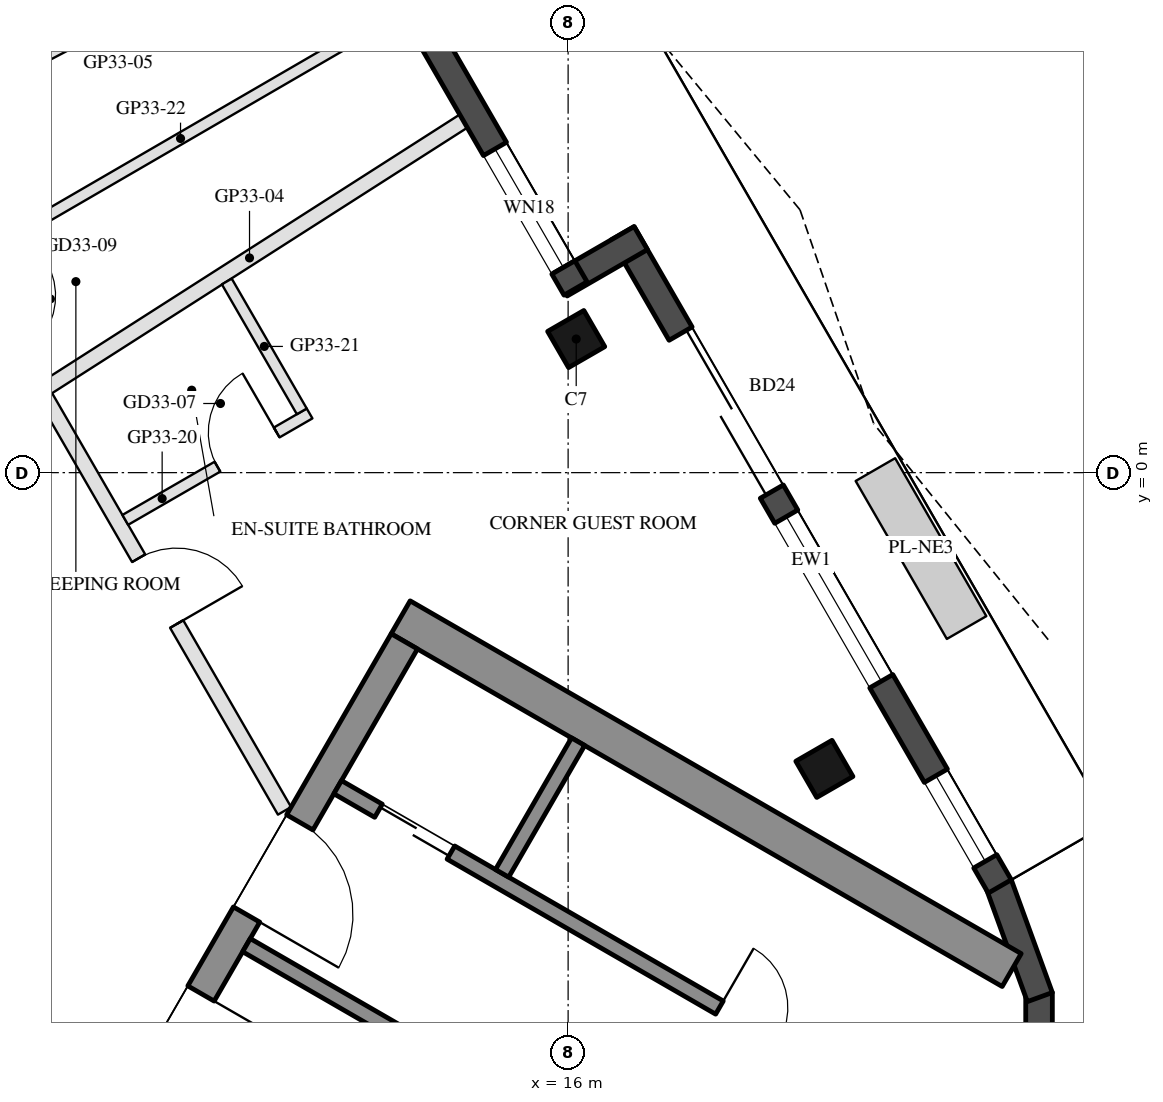
"""IFC4 building model, lengths in metres.
Left out: names, types, materials, properties, quantities, classifications, styles, units other than length and angle.
Written with IfcOpenShell. Run it as: python <this file> out.ifc"""

import sys

from ifc_helpers import new_model, si_unit, direction, frame, frame_2d, origin, origin_2d, place, context, subcontext, project, spatial, rectangle, hollow_rectangle, extrude, boolean, halfspace, element, fill, save


model = new_model("IFC4")
c1 = context("Model", 3, precision=1e-05, world=origin(), true_north=direction((0.0, 1.0)))
c2 = subcontext(c1, "Body", "Model", "MODEL_VIEW")
j1 = project(units=[si_unit("LENGTHUNIT", "METRE"), si_unit("PLANEANGLEUNIT", "RADIAN")], contexts=[c1])
p1 = place(None, origin())
s1 = spatial("IfcSite", under=j1, at=p1, CompositionType="ELEMENT")
p2 = place(p1, origin())
s2 = spatial("IfcBuilding", under=s1, at=p2, CompositionType="ELEMENT")
p3 = place(p2, frame((0.0, 0.0, 313.3)))
s3 = spatial("IfcBuildingStorey", under=s2, at=p3, CompositionType="ELEMENT", Elevation=313.3)
p4 = place(p3, frame((19.372, -3.898, 0.0), z_axis=(0.0, 0.0, 1.0), x_axis=(-0.5, 0.866025403784, 0.0)))
e1 = element("IfcColumn", 1, at=p4, inside=s3, PredefinedType="COLUMN", context=c2, shape_type="SweptSolid", body=[
    boolean("DIFFERENCE", extrude(hollow_rectangle(XDim=0.55, YDim=0.55, WallThickness=0.025, at=origin_2d()), origin(), (0.0, 0.0, 1.0), 3.7), halfspace(frame((0.0, 0.0, 0.04), z_axis=(0.0, 0.0, 1.0), x_axis=(1.0, 0.0, 0.0)), True)),
])
p5 = place(p3, frame((16.106, 1.758, 0.0), z_axis=(0.0, 0.0, 1.0), x_axis=(-0.5, 0.866025403784, 0.0)))
e2 = element("IfcColumn", 2, at=p5, inside=s3, PredefinedType="COLUMN", context=c2, shape_type="SweptSolid", body=[
    boolean("DIFFERENCE", extrude(hollow_rectangle(XDim=0.55, YDim=0.55, WallThickness=0.025, at=origin_2d()), origin(), (0.0, 0.0, 1.0), 3.7), halfspace(frame((0.0, 0.0, 0.034), z_axis=(0.0, 0.0, 1.0), x_axis=(1.0, 0.0, 0.0)), True)),
])
for number, where, z_axis, x_axis in (
    (3, (22.196, -8.42, 0.0), (0.0, 0.0, 1.0), (0.0, 1.0, 0.0)),
    (4, (22.206, -6.9, 0.0), (0.0, 0.0, 1.0), (-0.342, 0.94, 0.0)),
):
    element("IfcWall", number, at=place(p3, frame(where, z_axis=z_axis, x_axis=x_axis)), inside=s3, PredefinedType="SOLIDWALL", context=c2, shape_type="SweptSolid", body=[
        extrude(rectangle(XDim=1.579, YDim=0.35, at=frame_2d((0.79, 0.0))), origin(), (0.0, 0.0, 1.0), 3.55),
    ])
p6 = place(p3, frame((21.679, -5.444, 0.0), z_axis=(0.0, 0.0, 1.0), x_axis=(-0.500020587865, 0.866013517049, 0.0)))
e5 = element("IfcWall", 5, at=p6, inside=s3, PredefinedType="SOLIDWALL", context=c2, shape_type="SweptSolid", body=[
    extrude(rectangle(XDim=9.924, YDim=0.35, at=frame_2d((4.962, 0.0))), origin(), (0.0, 0.0, 1.0), 3.55),
])
p7 = place(p6, frame((0.381, 0.0, 0.3)))
e6 = element("IfcOpeningElement", 6, at=p7, cuts=e5, PredefinedType="OPENING", context=c2, shape_type="SweptSolid", body=[
    extrude(rectangle(XDim=1.3, YDim=2.65, at=frame_2d((0.65, 1.325))), frame((0.0, 0.185, 0.0), z_axis=(0.0, -1.0, 0.0), x_axis=(1.0, 0.0, 0.0)), (0.0, 0.0, 1.0), 0.37),
])
p8 = place(p6, frame((5.999, 0.0, 0.0)))
e7 = element("IfcOpeningElement", 7, at=p8, cuts=e5, PredefinedType="OPENING", context=c2, shape_type="SweptSolid", body=[
    extrude(rectangle(XDim=2.4, YDim=2.4, at=frame_2d((1.2, 1.2))), frame((0.0, 0.185, 0.0), z_axis=(0.0, -1.0, 0.0), x_axis=(1.0, 0.0, 0.0)), (0.0, 0.0, 1.0), 0.37),
])
p9 = place(p6, frame((3.118, 0.0, 0.3)))
e8 = element("IfcOpeningElement", 8, at=p9, cuts=e5, PredefinedType="OPENING", context=c2, shape_type="SweptSolid", body=[
    extrude(rectangle(XDim=2.5, YDim=2.65, at=frame_2d((1.25, 1.325))), frame((0.0, 0.185, 0.0), z_axis=(0.0, -1.0, 0.0), x_axis=(1.0, 0.0, 0.0)), (0.0, 0.0, 1.0), 0.37),
])
p10 = place(p3, frame((16.956, 3.086, 0.0), z_axis=(0.0, 0.0, 1.0), x_axis=(-0.866005645448, -0.500034220881, 0.0)))
e9 = element("IfcWall", 9, at=p10, inside=s3, PredefinedType="SOLIDWALL", context=c2, shape_type="SweptSolid", body=[
    extrude(rectangle(XDim=1.22, YDim=0.35, at=frame_2d((0.61, 0.0))), origin(), (0.0, 0.0, 1.0), 3.55),
])
p11 = place(p3, frame((16.098, 2.423, 0.0), z_axis=(0.0, 0.0, 1.0), x_axis=(-0.499996591357, 0.866027371756, 0.0)))
e10 = element("IfcWall", 10, at=p11, inside=s3, PredefinedType="SOLIDWALL", context=c2, shape_type="SweptSolid", body=[
    extrude(rectangle(XDim=5.371, YDim=0.35, at=frame_2d((2.685, 0.0))), origin(), (0.0, 0.0, 1.0), 3.55),
])
p12 = place(p11, frame((0.32, 0.0, 0.3)))
e11 = element("IfcOpeningElement", 11, at=p12, cuts=e10, PredefinedType="OPENING", context=c2, shape_type="SweptSolid", body=[
    extrude(rectangle(XDim=1.8, YDim=2.65, at=frame_2d((0.9, 1.325))), frame((0.0, 0.185, 0.0), z_axis=(0.0, -1.0, 0.0), x_axis=(1.0, 0.0, 0.0)), (0.0, 0.0, 1.0), 0.37),
])
p13 = place(p3, frame((13.797, -1.903, 0.0), z_axis=(0.0, 0.0, 1.0), x_axis=(0.866025286072, -0.500000203884, 0.0)))
e12 = element("IfcWall", 12, at=p13, inside=s3, PredefinedType="SHEAR", context=c2, shape_type="SweptSolid", body=[
    extrude(rectangle(XDim=9.283, YDim=0.5, at=frame_2d((4.641, 0.0))), origin(), (0.0, 0.0, 1.0), 3.5),
])
p14 = place(p3, frame((8.845, -10.88, 0.0), z_axis=(0.0, 0.0, 1.0), x_axis=(0.500004234368, 0.866022959057, 0.0)))
e13 = element("IfcWall", 13, at=p14, inside=s3, PredefinedType="SHEAR", context=c2, shape_type="SweptSolid", body=[
    extrude(rectangle(XDim=10.0, YDim=0.4, at=frame_2d((5.0, 0.0))), origin(), (0.0, 0.0, 1.0), 3.5),
])
p15 = place(p14, frame((3.55, 0.0, 0.0)))
e14 = element("IfcOpeningElement", 14, at=p15, cuts=e13, PredefinedType="OPENING", context=c2, shape_type="SweptSolid", body=[
    extrude(rectangle(XDim=1.1, YDim=2.1, at=frame_2d((0.55, 1.05))), frame((0.0, 0.21, 0.0), z_axis=(0.0, -1.0, 0.0), x_axis=(1.0, 0.0, 0.0)), (0.0, 0.0, 1.0), 0.42),
])
p16 = place(p14, frame((5.85, 0.0, 0.0)))
e15 = element("IfcOpeningElement", 15, at=p16, cuts=e13, PredefinedType="OPENING", context=c2, shape_type="SweptSolid", body=[
    extrude(rectangle(XDim=1.4, YDim=2.1, at=frame_2d((0.7, 1.05))), frame((0.0, 0.21, 0.0), z_axis=(0.0, -1.0, 0.0), x_axis=(1.0, 0.0, 0.0)), (0.0, 0.0, 1.0), 0.42),
])
p17 = place(p3, frame((11.768, -6.217, 0.0), z_axis=(0.0, 0.0, 1.0), x_axis=(0.866050077142, -0.499957262057, 0.0)))
e16 = element("IfcWall", 16, at=p17, inside=s3, PredefinedType="SHEAR", context=c2, shape_type="SweptSolid", body=[
    extrude(rectangle(XDim=2.4, YDim=0.2, at=frame_2d((1.2, 0.0))), origin(), (0.0, 0.0, 1.0), 3.5),
])
p18 = place(p3, frame((12.968, -4.138, 0.0), z_axis=(0.0, 0.0, 1.0), x_axis=(0.866025710499, -0.499999468754, 0.0)))
e17 = element("IfcWall", 17, at=p18, inside=s3, PredefinedType="SHEAR", context=c2, shape_type="SweptSolid", body=[
    extrude(rectangle(XDim=10.121, YDim=0.2, at=frame_2d((5.061, 0.0))), origin(), (0.0, 0.0, 1.0), 3.5),
])
p19 = place(p18, frame((0.62, 0.0, 0.0)))
e18 = element("IfcOpeningElement", 18, at=p19, cuts=e17, PredefinedType="OPENING", context=c2, shape_type="SweptSolid", body=[
    extrude(rectangle(XDim=1.1, YDim=2.1, at=frame_2d((0.55, 1.05))), frame((0.0, 0.11, 0.0), z_axis=(0.0, -1.0, 0.0), x_axis=(1.0, 0.0, 0.0)), (0.0, 0.0, 1.0), 0.22),
])
p20 = place(p18, frame((5.8, 0.0, 0.0)))
e19 = element("IfcOpeningElement", 19, at=p20, cuts=e17, PredefinedType="OPENING", context=c2, shape_type="SweptSolid", body=[
    extrude(rectangle(XDim=0.9, YDim=2.1, at=frame_2d((0.45, 1.05))), frame((0.0, 0.11, 0.0), z_axis=(0.0, -1.0, 0.0), x_axis=(1.0, 0.0, 0.0)), (0.0, 0.0, 1.0), 0.22),
])
p21 = place(p3, frame((15.131, -5.272, 0.0), z_axis=(0.0, 0.0, 1.0), x_axis=(0.499972520799, 0.866041268327, 0.0)))
e20 = element("IfcWall", 20, at=p21, inside=s3, PredefinedType="SHEAR", context=c2, shape_type="SweptSolid", body=[
    extrude(rectangle(XDim=2.0, YDim=0.2, at=frame_2d((1.0, 0.0))), origin(), (0.0, 0.0, 1.0), 3.5),
])
p22 = place(p3, frame((14.624, 4.625, 0.0), z_axis=(0.0, 0.0, 1.0), x_axis=(-0.842484919653, -0.53871992738, 0.0)))
e21 = element("IfcWall", 21, at=p22, inside=s3, PredefinedType="PARTITIONING", context=c2, shape_type="SweptSolid", body=[
    extrude(rectangle(XDim=6.685, YDim=0.2, at=frame_2d((3.342, 0.0))), origin(), (0.0, 0.0, 1.0), 3.1),
])
p23 = place(p3, frame((12.576, 7.323, 0.0), z_axis=(0.0, 0.0, 1.0), x_axis=(-0.885630617544, -0.464390363023, 0.0)))
e22 = element("IfcWall", 22, at=p23, inside=s3, PredefinedType="PARTITIONING", context=c2, shape_type="SweptSolid", body=[
    extrude(rectangle(XDim=6.258, YDim=0.2, at=frame_2d((3.129, 0.0))), origin(), (0.0, 0.0, 1.0), 3.1),
])
p24 = place(p3, frame((9.127, 0.992, 0.0), z_axis=(0.0, 0.0, 1.0), x_axis=(0.500012817413, -0.866018003521, 0.0)))
e23 = element("IfcWall", 23, at=p24, inside=s3, PredefinedType="PARTITIONING", context=c2, shape_type="SweptSolid", body=[
    extrude(rectangle(XDim=6.283, YDim=0.2, at=frame_2d((3.142, 0.0))), origin(), (0.0, 0.0, 1.0), 3.1),
])
p25 = place(p24, frame((2.446, 0.0, 0.0)))
e24 = element("IfcOpeningElement", 24, at=p25, cuts=e23, PredefinedType="OPENING", context=c2, shape_type="SweptSolid", body=[
    extrude(rectangle(XDim=1.0, YDim=2.1, at=frame_2d((0.5, 1.05))), frame((0.0, 0.11, 0.0), z_axis=(0.0, -1.0, 0.0), x_axis=(1.0, 0.0, 0.0)), (0.0, 0.0, 1.0), 0.22),
])
p26 = place(p3, frame((10.174, -0.622, 0.0), z_axis=(0.0, 0.0, 1.0), x_axis=(0.865996816683, 0.500049511043, 0.0)))
e25 = element("IfcWall", 25, at=p26, inside=s3, PredefinedType="PARTITIONING", context=c2, shape_type="SweptSolid", body=[
    extrude(rectangle(XDim=2.8, YDim=0.15, at=frame_2d((1.4, 0.0))), origin(), (0.0, 0.0, 1.0), 3.55),
])
p27 = place(p26, frame((1.4, 0.0, 0.0)))
e26 = element("IfcOpeningElement", 26, at=p27, cuts=e25, PredefinedType="OPENING", context=c2, shape_type="SweptSolid", body=[
    extrude(rectangle(XDim=0.9, YDim=2.1, at=frame_2d((0.45, 1.05))), frame((0.0, 0.085, 0.0), z_axis=(0.0, -1.0, 0.0), x_axis=(1.0, 0.0, 0.0)), (0.0, 0.0, 1.0), 0.17),
])
p28 = place(p3, frame((12.496, 0.806, 0.0), z_axis=(0.0, 0.0, 1.0), x_axis=(-0.499904503454, 0.866080531721, 0.0)))
e27 = element("IfcWall", 27, at=p28, inside=s3, PredefinedType="PARTITIONING", context=c2, shape_type="SweptSolid", body=[
    extrude(rectangle(XDim=1.974, YDim=0.15, at=frame_2d((0.987, 0.0))), origin(), (0.0, 0.0, 1.0), 3.55),
])
p29 = place(p3, frame((13.788, 6.073, 0.0), z_axis=(0.0, 0.0, 1.0), x_axis=(-0.864855005342, -0.502021732334, 0.0)))
e28 = element("IfcWall", 28, at=p29, inside=s3, PredefinedType="PARTITIONING", context=c2, shape_type="SweptSolid", body=[
    extrude(rectangle(XDim=6.677, YDim=0.15, at=frame_2d((3.339, 0.0))), origin(), (0.0, 0.0, 1.0), 3.16),
])
p30 = place(p7, origin())
e29 = element("IfcWindow", 29, at=p30, inside=s3, PartitioningType="SINGLE_PANEL", PredefinedType="WINDOW", context=c2, shape_type="SweptSolid", body=[
    extrude(rectangle(XDim=1.3, YDim=2.65, at=frame_2d((0.65, 1.325))), frame((0.0, 0.03, 0.0), z_axis=(0.0, -1.0, 0.0), x_axis=(1.0, 0.0, 0.0)), (0.0, 0.0, 1.0), 0.06),
])
fill(e6, e29)
p31 = place(p8, frame((2.4, 0.0, 0.0), z_axis=(0.0, 0.0, 1.0), x_axis=(-1.0, 0.0, 0.0)))
e30 = element("IfcDoor", 30, at=p31, inside=s3, OperationType="SLIDING_TO_LEFT", PredefinedType="DOOR", context=c2, shape_type="SweptSolid", body=[
    extrude(rectangle(XDim=2.4, YDim=2.4, at=frame_2d((1.2, 1.2))), frame((0.0, 0.025, 0.0), z_axis=(0.0, -1.0, 0.0), x_axis=(1.0, 0.0, 0.0)), (0.0, 0.0, 1.0), 0.05),
])
fill(e7, e30)
p32 = place(p9, origin())
e31 = element("IfcWindow", 31, at=p32, inside=s3, PartitioningType="SINGLE_PANEL", PredefinedType="WINDOW", context=c2, shape_type="SweptSolid", body=[
    extrude(rectangle(XDim=2.5, YDim=2.65, at=frame_2d((1.25, 1.325))), frame((0.0, 0.03, 0.0), z_axis=(0.0, -1.0, 0.0), x_axis=(1.0, 0.0, 0.0)), (0.0, 0.0, 1.0), 0.06),
])
fill(e8, e31)
p33 = place(p12, origin())
e32 = element("IfcWindow", 32, at=p33, inside=s3, PartitioningType="SINGLE_PANEL", PredefinedType="WINDOW", context=c2, shape_type="SweptSolid", body=[
    extrude(rectangle(XDim=1.8, YDim=2.65, at=frame_2d((0.9, 1.325))), frame((0.0, 0.03, 0.0), z_axis=(0.0, -1.0, 0.0), x_axis=(1.0, 0.0, 0.0)), (0.0, 0.0, 1.0), 0.06),
])
fill(e11, e32)
p34 = place(p19, origin())
e33 = element("IfcDoor", 33, at=p34, inside=s3, OperationType="DOUBLE_DOOR_SLIDING", PredefinedType="DOOR", context=c2, shape_type="SweptSolid", body=[
    extrude(rectangle(XDim=1.1, YDim=2.1, at=frame_2d((0.55, 1.05))), frame((0.0, 0.025, 0.0), z_axis=(0.0, -1.0, 0.0), x_axis=(1.0, 0.0, 0.0)), (0.0, 0.0, 1.0), 0.05),
])
fill(e18, e33)
p35 = place(p20, origin())
e34 = element("IfcDoor", 34, at=p35, inside=s3, OperationType="SINGLE_SWING_LEFT", PredefinedType="DOOR", context=c2, shape_type="SweptSolid", body=[
    extrude(rectangle(XDim=0.9, YDim=2.1, at=frame_2d((0.45, 1.05))), frame((0.0, 0.025, 0.0), z_axis=(0.0, -1.0, 0.0), x_axis=(1.0, 0.0, 0.0)), (0.0, 0.0, 1.0), 0.05),
])
fill(e19, e34)
p36 = place(p15, frame((1.1, 0.0, 0.0), z_axis=(0.0, 0.0, 1.0), x_axis=(-1.0, 0.0, 0.0)))
e35 = element("IfcDoor", 35, at=p36, inside=s3, OperationType="SINGLE_SWING_LEFT", PredefinedType="DOOR", context=c2, shape_type="SweptSolid", body=[
    extrude(rectangle(XDim=1.1, YDim=2.1, at=frame_2d((0.55, 1.05))), frame((0.0, 0.025, 0.0), z_axis=(0.0, -1.0, 0.0), x_axis=(1.0, 0.0, 0.0)), (0.0, 0.0, 1.0), 0.05),
])
fill(e14, e35)
p37 = place(p16, frame((1.4, 0.0, 0.0), z_axis=(0.0, 0.0, 1.0), x_axis=(-1.0, 0.0, 0.0)))
e36 = element("IfcDoor", 36, at=p37, inside=s3, OperationType="DOUBLE_DOOR_SINGLE_SWING", PredefinedType="DOOR", context=c2, shape_type="SweptSolid", body=[
    extrude(rectangle(XDim=1.4, YDim=2.1, at=frame_2d((0.7, 1.05))), frame((0.0, 0.025, 0.0), z_axis=(0.0, -1.0, 0.0), x_axis=(1.0, 0.0, 0.0)), (0.0, 0.0, 1.0), 0.05),
])
fill(e15, e36)
p38 = place(p27, origin())
e37 = element("IfcDoor", 37, at=p38, inside=s3, OperationType="SINGLE_SWING_RIGHT", PredefinedType="DOOR", context=c2, shape_type="SweptSolid", body=[
    extrude(rectangle(XDim=0.9, YDim=2.1, at=frame_2d((0.45, 1.05))), frame((0.0, 0.025, 0.0), z_axis=(0.0, -1.0, 0.0), x_axis=(1.0, 0.0, 0.0)), (0.0, 0.0, 1.0), 0.05),
])
fill(e26, e37)
p39 = place(p25, origin())
e38 = element("IfcDoor", 38, at=p39, inside=s3, OperationType="SINGLE_SWING_RIGHT", PredefinedType="DOOR", context=c2, shape_type="SweptSolid", body=[
    extrude(rectangle(XDim=1.0, YDim=2.1, at=frame_2d((0.5, 1.05))), frame((0.0, 0.025, 0.0), z_axis=(0.0, -1.0, 0.0), x_axis=(1.0, 0.0, 0.0)), (0.0, 0.0, 1.0), 0.05),
])
fill(e24, e38)
save(model, sys.argv[1])
